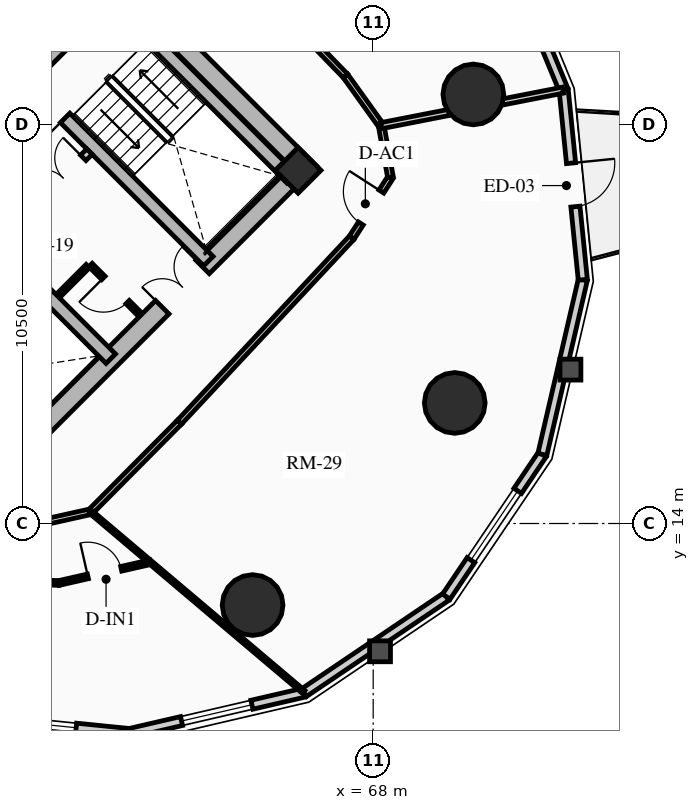
"""IFC4 building model, lengths in metres.
Left out: names, types, materials, properties, quantities, classifications, styles, units other than length and angle.
Written with IfcOpenShell. Run it as: python <this file> out.ifc"""

import sys

from ifc_helpers import new_model, si_unit, direction, frame, frame_2d, origin, origin_2d, place, context, subcontext, project, spatial, rectangle, circle, extrude, source, transform, mapped, element, fill, save


model = new_model("IFC4")
c1 = context("Model", 3, precision=1e-05, world=origin(), true_north=direction((0.0, 1.0)))
c2 = subcontext(c1, "Body", "Model", "MODEL_VIEW")
j1 = project(units=[si_unit("LENGTHUNIT", "METRE"), si_unit("PLANEANGLEUNIT", "RADIAN")], contexts=[c1])
p1 = place(None, origin())
s1 = spatial("IfcSite", under=j1, at=p1, CompositionType="ELEMENT")
p2 = place(p1, origin())
s2 = spatial("IfcBuilding", under=s1, at=p2, CompositionType="ELEMENT")
p3 = place(p2, frame((0.0, 0.0, 24.91)))
s3 = spatial("IfcBuildingStorey", under=s2, at=p3, CompositionType="ELEMENT", Elevation=24.91)
p4 = place(p3, frame((66.339, 23.227, 0.0), z_axis=(0.0, 0.0, 1.0), x_axis=(-0.707106781187, 0.707106781187, 0.0)))
e1 = element("IfcWall", 1, at=p4, inside=s3, PredefinedType="SHEAR", context=c2, shape_type="SweptSolid", body=[
    extrude(rectangle(XDim=14.3, YDim=0.5, at=frame_2d((7.15, 0.0))), origin(), (0.0, 0.0, 1.0), 2.91),
])
p5 = place(p3, frame((58.596, 15.838, 0.0), z_axis=(0.0, 0.0, 1.0), x_axis=(0.707106781187, 0.707106781187, 0.0)))
e2 = element("IfcWall", 2, at=p5, inside=s3, PredefinedType="SHEAR", context=c2, shape_type="SweptSolid", body=[
    extrude(rectangle(XDim=10.7, YDim=0.5, at=frame_2d((5.35, 0.0))), origin(), (0.0, 0.0, 1.0), 2.91),
])
m1 = source(origin(), c2, "Body", "SweptSolid", [
    extrude(rectangle(XDim=1.5, YDim=2.02, at=frame_2d((0.75, 1.01))), frame((0.0, 0.26, 0.0), z_axis=(0.0, -1.0, 0.0), x_axis=(1.0, 0.0, 0.0)), (0.0, 0.0, 1.0), 0.52),
])
p6 = place(p5, frame((5.45, 0.0, 0.0)))
e3 = element("IfcOpeningElement", 3, at=p6, cuts=e2, PredefinedType="OPENING", context=c2, shape_type="MappedRepresentation", body=[
    mapped(m1, transform((0.0, 0.0, 0.0), x_axis=(1.0, 0.0, 0.0), y_axis=(0.0, 1.0, 0.0), z_axis=(0.0, 0.0, 1.0), scale=1.0)),
])
p7 = place(p3, frame((61.096, 18.338, 0.0), z_axis=(0.0, 0.0, 1.0), x_axis=(-0.707106781187, 0.707106781187, 0.0)))
e4 = element("IfcWall", 4, at=p7, inside=s3, PredefinedType="SHEAR", context=c2, shape_type="SweptSolid", body=[
    extrude(rectangle(XDim=13.8, YDim=0.35, at=frame_2d((6.9, 0.0))), origin(), (0.0, 0.0, 1.0), 2.91),
])
m2 = source(origin(), c2, "Body", "SweptSolid", [
    extrude(rectangle(XDim=1.1, YDim=2.015, at=frame_2d((0.55, 1.007))), frame((0.0, 0.185, 0.0), z_axis=(0.0, -1.0, 0.0), x_axis=(1.0, 0.0, 0.0)), (0.0, 0.0, 1.0), 0.37),
])
p8 = place(p7, frame((4.9, 0.0, 0.0)))
e5 = element("IfcOpeningElement", 5, at=p8, cuts=e4, PredefinedType="OPENING", context=c2, shape_type="MappedRepresentation", body=[
    mapped(m2, transform((0.0, 0.0, 0.0), x_axis=(1.0, 0.0, 0.0), y_axis=(0.0, 1.0, 0.0), z_axis=(0.0, 0.0, 1.0), scale=1.0)),
])
m3 = source(origin(), c2, "Body", "SweptSolid", [
    extrude(rectangle(XDim=1.15, YDim=2.02, at=frame_2d((0.575, 1.01))), frame((0.0, 0.185, 0.0), z_axis=(0.0, -1.0, 0.0), x_axis=(1.0, 0.0, 0.0)), (0.0, 0.0, 1.0), 0.37),
])
p9 = place(p7, frame((7.32, 0.0, 0.0)))
e6 = element("IfcOpeningElement", 6, at=p9, cuts=e4, PredefinedType="OPENING", context=c2, shape_type="MappedRepresentation", body=[
    mapped(m3, transform((0.0, 0.0, 0.0), x_axis=(1.0, 0.0, 0.0), y_axis=(0.0, 1.0, 0.0), z_axis=(0.0, 0.0, 1.0), scale=1.0)),
])
p10 = place(p3, frame((63.662, 20.904, 0.0), z_axis=(0.0, 0.0, 1.0), x_axis=(-0.707106781187, 0.707106781187, 0.0)))
e7 = element("IfcWall", 7, at=p10, inside=s3, PredefinedType="SHEAR", context=c2, shape_type="SweptSolid", body=[
    extrude(rectangle(XDim=13.8, YDim=0.35, at=frame_2d((6.9, 0.0))), origin(), (0.0, 0.0, 1.0), 2.91),
])
p11 = place(p10, frame((10.025, 0.0, 0.0)))
e8 = element("IfcOpeningElement", 8, at=p11, cuts=e7, PredefinedType="OPENING", context=c2, shape_type="MappedRepresentation", body=[
    mapped(m2, transform((0.0, 0.0, 0.0), x_axis=(1.0, 0.0, 0.0), y_axis=(0.0, 1.0, 0.0), z_axis=(0.0, 0.0, 1.0), scale=1.0)),
])
p12 = place(p10, frame((12.025, 0.0, 0.0)))
e9 = element("IfcOpeningElement", 9, at=p12, cuts=e7, PredefinedType="OPENING", context=c2, shape_type="MappedRepresentation", body=[
    mapped(m2, transform((0.0, 0.0, 0.0), x_axis=(1.0, 0.0, 0.0), y_axis=(0.0, 1.0, 0.0), z_axis=(0.0, 0.0, 1.0), scale=1.0)),
])
p13 = place(p10, frame((5.33, 0.0, 0.0)))
e10 = element("IfcOpeningElement", 10, at=p13, cuts=e7, PredefinedType="OPENING", context=c2, shape_type="MappedRepresentation", body=[
    mapped(m3, transform((0.0, 0.0, 0.0), x_axis=(1.0, 0.0, 0.0), y_axis=(0.0, 1.0, 0.0), z_axis=(0.0, 0.0, 1.0), scale=1.0)),
])
p14 = place(p3, frame((65.847, 23.089, 0.0), z_axis=(0.0, 0.0, 1.0), x_axis=(-0.707106781187, 0.707106781187, 0.0)))
e11 = element("IfcWall", 11, at=p14, inside=s3, PredefinedType="SHEAR", context=c2, shape_type="SweptSolid", body=[
    extrude(rectangle(XDim=6.745, YDim=0.35, at=frame_2d((3.373, 0.0))), origin(), (0.0, 0.0, 1.0), 2.91),
])
p15 = place(p3, frame((58.893, 25.674, 0.0), z_axis=(0.0, 0.0, 1.0), x_axis=(0.707106781187, 0.707106781187, 0.0)))
e12 = element("IfcWall", 12, at=p15, inside=s3, PredefinedType="SHEAR", context=c2, shape_type="SweptSolid", body=[
    extrude(rectangle(XDim=3.285, YDim=0.35, at=frame_2d((1.643, 0.0))), origin(), (0.0, 0.0, 1.0), 2.91),
])
p16 = place(p3, frame((66.024, 23.294, 0.0), z_axis=(0.0, 0.0, 1.0), x_axis=(0.707106781187, 0.707106781187, 0.0)))
e13 = element("IfcColumn", 13, at=p16, inside=s3, PredefinedType="COLUMN", context=c2, shape_type="SweptSolid", body=[
    extrude(rectangle(XDim=0.85, YDim=0.85, at=origin_2d()), origin(), (0.0, 0.0, 1.0), 2.91),
])
for number, where, z_axis, x_axis in (
    (14, (64.827, 11.854, 0.0), (0.0, 0.0, 1.0), (1.0, 0.0, 0.0)),
    (15, (70.146, 17.173, 0.0), (0.0, 0.0, 1.0), (1.0, 0.0, 0.0)),
    (16, (70.635, 25.291, 0.0), (0.0, 0.0, 1.0), (1.0, 0.0, 0.0)),
):
    element("IfcColumn", number, at=place(p3, frame(where, z_axis=z_axis, x_axis=x_axis)), inside=s3, PredefinedType="USERDEFINED", context=c2, shape_type="SweptSolid", body=[
        extrude(circle(Radius=0.8, at=origin_2d()), origin(), (0.0, 0.0, 1.0), 2.91),
    ])
p17 = place(p3, frame((61.586, 8.484, 0.0), z_axis=(0.0, 0.0, 1.0), x_axis=(-0.994951574538, 0.100356187272, 0.0)))
e17 = element("IfcWall", 17, at=p17, inside=s3, PredefinedType="SOLIDWALL", context=c2, shape_type="SweptSolid", body=[
    extrude(rectangle(XDim=5.019, YDim=0.24, at=frame_2d((2.509, 0.0))), origin(), (0.0, 0.0, 1.0), 2.073),
])
m4 = source(origin(), c2, "Body", "SweptSolid", [
    extrude(rectangle(XDim=2.2, YDim=1.35, at=frame_2d((1.1, 0.675))), frame((0.0, 0.13, 0.0), z_axis=(0.0, -1.0, 0.0), x_axis=(1.0, 0.0, 0.0)), (0.0, 0.0, 1.0), 0.26),
])
p18 = place(p17, frame((1.409, 0.0, 0.65)))
e18 = element("IfcOpeningElement", 18, at=p18, cuts=e17, PredefinedType="OPENING", context=c2, shape_type="MappedRepresentation", body=[
    mapped(m4, transform((0.0, 0.0, 0.0), x_axis=(1.0, 0.0, 0.0), y_axis=(0.0, 1.0, 0.0), z_axis=(0.0, 0.0, 1.0), scale=1.0)),
])
p19 = place(p3, frame((66.18, 9.548, 0.0), z_axis=(0.0, 0.0, 1.0), x_axis=(-0.974197104074, -0.225698919833, 0.0)))
e19 = element("IfcWall", 19, at=p19, inside=s3, PredefinedType="SOLIDWALL", context=c2, shape_type="SweptSolid", body=[
    extrude(rectangle(XDim=4.715, YDim=0.24, at=frame_2d((2.357, 0.0))), origin(), (0.0, 0.0, 1.0), 2.073),
])
m5 = source(origin(), c2, "Body", "SweptSolid", [
    extrude(rectangle(XDim=1.9, YDim=1.35, at=frame_2d((0.95, 0.675))), frame((0.0, 0.13, 0.0), z_axis=(0.0, -1.0, 0.0), x_axis=(1.0, 0.0, 0.0)), (0.0, 0.0, 1.0), 0.26),
])
p20 = place(p19, frame((1.408, 0.0, 0.65)))
e20 = element("IfcOpeningElement", 20, at=p20, cuts=e19, PredefinedType="OPENING", context=c2, shape_type="MappedRepresentation", body=[
    mapped(m5, transform((0.0, 0.0, 0.0), x_axis=(1.0, 0.0, 0.0), y_axis=(0.0, 1.0, 0.0), z_axis=(0.0, 0.0, 1.0), scale=1.0)),
])
p21 = place(p3, frame((69.924, 12.076, 0.0), z_axis=(0.0, 0.0, 1.0), x_axis=(-0.828776615238, -0.559579594012, 0.0)))
e21 = element("IfcWall", 21, at=p21, inside=s3, PredefinedType="SOLIDWALL", context=c2, shape_type="SweptSolid", body=[
    extrude(rectangle(XDim=4.517, YDim=0.24, at=frame_2d((2.259, 0.0))), origin(), (0.0, 0.0, 1.0), 2.073),
])
p22 = place(p3, frame((72.452, 15.82, 0.0), z_axis=(0.0, 0.0, 1.0), x_axis=(-0.559579594012, -0.828776615238, 0.0)))
e22 = element("IfcWall", 22, at=p22, inside=s3, PredefinedType="SOLIDWALL", context=c2, shape_type="SweptSolid", body=[
    extrude(rectangle(XDim=4.517, YDim=0.24, at=frame_2d((2.259, 0.0))), origin(), (0.0, 0.0, 1.0), 2.073),
])
p23 = place(p22, frame((1.159, 0.0, 0.65)))
e23 = element("IfcOpeningElement", 23, at=p23, cuts=e22, PredefinedType="OPENING", context=c2, shape_type="MappedRepresentation", body=[
    mapped(m4, transform((0.0, 0.0, 0.0), x_axis=(1.0, 0.0, 0.0), y_axis=(0.0, 1.0, 0.0), z_axis=(0.0, 0.0, 1.0), scale=1.0)),
])
p24 = place(p3, frame((73.516, 20.414, 0.0), z_axis=(0.0, 0.0, 1.0), x_axis=(-0.225698919833, -0.974197104074, 0.0)))
e24 = element("IfcWall", 24, at=p24, inside=s3, PredefinedType="SOLIDWALL", context=c2, shape_type="SweptSolid", body=[
    extrude(rectangle(XDim=4.715, YDim=0.24, at=frame_2d((2.357, 0.0))), origin(), (0.0, 0.0, 1.0), 2.073),
])
p25 = place(p3, frame((73.012, 25.407, 0.0), z_axis=(0.0, 0.0, 1.0), x_axis=(0.100356187272, -0.994951574538, 0.0)))
e25 = element("IfcWall", 25, at=p25, inside=s3, PredefinedType="SOLIDWALL", context=c2, shape_type="SweptSolid", body=[
    extrude(rectangle(XDim=5.019, YDim=0.24, at=frame_2d((2.509, 0.0))), origin(), (0.0, 0.0, 1.0), 2.073),
])
m6 = source(origin(), c2, "Body", "SweptSolid", [
    extrude(rectangle(XDim=1.15, YDim=2.005, at=frame_2d((0.575, 1.002))), frame((0.0, 0.13, 0.0), z_axis=(0.0, -1.0, 0.0), x_axis=(1.0, 0.0, 0.0)), (0.0, 0.0, 1.0), 0.26),
])
p26 = place(p25, frame((1.934, 0.0, 0.0)))
e26 = element("IfcOpeningElement", 26, at=p26, cuts=e25, PredefinedType="OPENING", context=c2, shape_type="MappedRepresentation", body=[
    mapped(m6, transform((0.0, 0.0, 0.0), x_axis=(1.0, 0.0, 0.0), y_axis=(0.0, 1.0, 0.0), z_axis=(0.0, 0.0, 1.0), scale=1.0)),
])
p27 = place(p3, frame((70.99, 30.312, 0.0), z_axis=(0.0, 0.0, 1.0), x_axis=(0.381113147118, -0.924528403616, 0.0)))
e27 = element("IfcWall", 27, at=p27, inside=s3, PredefinedType="SOLIDWALL", context=c2, shape_type="SweptSolid", body=[
    extrude(rectangle(XDim=5.305, YDim=0.24, at=frame_2d((2.653, 0.0))), origin(), (0.0, 0.0, 1.0), 2.073),
])
p28 = place(p3, frame((58.214, 21.467, 0.0), z_axis=(0.0, 0.0, 1.0), x_axis=(0.707106781187, 0.707106781187, 0.0)))
e28 = element("IfcWall", 28, at=p28, inside=s3, PredefinedType="PARTITIONING", context=c2, shape_type="SweptSolid", body=[
    extrude(rectangle(XDim=3.28, YDim=0.2, at=frame_2d((1.64, 0.0))), origin(), (0.0, 0.0, 1.0), 2.635),
])
m7 = source(origin(), c2, "Body", "SweptSolid", [
    extrude(rectangle(XDim=1.5, YDim=2.02, at=frame_2d((0.75, 1.01))), frame((0.0, 0.11, 0.0), z_axis=(0.0, -1.0, 0.0), x_axis=(1.0, 0.0, 0.0)), (0.0, 0.0, 1.0), 0.22),
])
p29 = place(p28, frame((1.55, 0.0, 0.0)))
e29 = element("IfcOpeningElement", 29, at=p29, cuts=e28, PredefinedType="OPENING", context=c2, shape_type="MappedRepresentation", body=[
    mapped(m7, transform((0.0, 0.0, 0.0), x_axis=(1.0, 0.0, 0.0), y_axis=(0.0, 1.0, 0.0), z_axis=(0.0, 0.0, 1.0), scale=1.0)),
])
p30 = place(p3, frame((61.835, 19.529, 0.0), z_axis=(0.0, 0.0, 1.0), x_axis=(-0.707174592913, 0.707038962956, 0.0)))
e30 = element("IfcWall", 30, at=p30, inside=s3, PredefinedType="PARTITIONING", context=c2, shape_type="SweptSolid", body=[
    extrude(rectangle(XDim=1.8, YDim=0.125, at=frame_2d((0.9, 0.0))), origin(), (0.0, 0.0, 1.0), 2.635),
])
m8 = source(origin(), c2, "Body", "SweptSolid", [
    extrude(rectangle(XDim=0.9, YDim=2.005, at=frame_2d((0.45, 1.002))), frame((0.0, 0.073, 0.0), z_axis=(0.0, -1.0, 0.0), x_axis=(1.0, 0.0, 0.0)), (0.0, 0.0, 1.0), 0.145),
])
p31 = place(p30, frame((0.42, 0.0, 0.0)))
e31 = element("IfcOpeningElement", 31, at=p31, cuts=e30, PredefinedType="OPENING", context=c2, shape_type="MappedRepresentation", body=[
    mapped(m8, transform((0.0, 0.0, 0.0), x_axis=(1.0, 0.0, 0.0), y_axis=(0.0, 1.0, 0.0), z_axis=(0.0, 0.0, 1.0), scale=1.0)),
])
p32 = place(p3, frame((59.713, 19.996, 0.0), z_axis=(0.0, 0.0, 1.0), x_axis=(0.707217726, 0.706995818963, 0.0)))
e32 = element("IfcWall", 32, at=p32, inside=s3, PredefinedType="PARTITIONING", context=c2, shape_type="SweptSolid", body=[
    extrude(rectangle(XDim=1.1, YDim=0.125, at=frame_2d((0.55, 0.0))), origin(), (0.0, 0.0, 1.0), 2.635),
])
p33 = place(p3, frame((59.008, 13.963, 0.0), z_axis=(0.0, 0.0, 1.0), x_axis=(0.976020856791, 0.21767702476, 0.0)))
e33 = element("IfcWall", 33, at=p33, inside=s3, PredefinedType="PARTITIONING", context=c2, shape_type="SweptSolid", body=[
    extrude(rectangle(XDim=1.593, YDim=0.15, at=frame_2d((0.796, 0.0))), origin(), (0.0, 0.0, 1.0), 2.205),
])
p34 = place(p3, frame((60.562, 14.31, 0.0), z_axis=(0.0, 0.0, 1.0), x_axis=(0.704566236161, 0.709638230975, 0.0)))
e34 = element("IfcWall", 34, at=p34, inside=s3, PredefinedType="PARTITIONING", context=c2, shape_type="SweptSolid", body=[
    extrude(rectangle(XDim=3.321, YDim=0.15, at=frame_2d((1.661, 0.0))), origin(), (0.0, 0.0, 1.0), 2.159),
])
p35 = place(p3, frame((62.903, 16.667, 0.0), z_axis=(0.0, 0.0, 1.0), x_axis=(0.682371947497, 0.731005147225, 0.0)))
e35 = element("IfcWall", 35, at=p35, inside=s3, PredefinedType="PARTITIONING", context=c2, shape_type="SweptSolid", body=[
    extrude(rectangle(XDim=6.642, YDim=0.15, at=frame_2d((3.321, 0.0))), origin(), (0.0, 0.0, 1.0), 2.159),
])
p36 = place(p3, frame((67.435, 21.521, 0.0), z_axis=(0.0, 0.0, 1.0), x_axis=(0.540777197838, 0.841165870859, 0.0)))
e36 = element("IfcWall", 36, at=p36, inside=s3, PredefinedType="PARTITIONING", context=c2, shape_type="SweptSolid", body=[
    extrude(rectangle(XDim=1.888, YDim=0.15, at=frame_2d((0.944, 0.0))), origin(), (0.0, 0.0, 1.0), 2.205),
])
m9 = source(origin(), c2, "Body", "SweptSolid", [
    extrude(rectangle(XDim=1.0, YDim=2.015, at=frame_2d((0.5, 1.007))), frame((0.0, 0.085, 0.0), z_axis=(0.0, -1.0, 0.0), x_axis=(1.0, 0.0, 0.0)), (0.0, 0.0, 1.0), 0.17),
])
p37 = place(p36, frame((0.444, 0.0, 0.0)))
e37 = element("IfcOpeningElement", 37, at=p37, cuts=e36, PredefinedType="OPENING", context=c2, shape_type="MappedRepresentation", body=[
    mapped(m9, transform((0.0, 0.0, 0.0), x_axis=(1.0, 0.0, 0.0), y_axis=(0.0, 1.0, 0.0), z_axis=(0.0, 0.0, 1.0), scale=1.0)),
])
p38 = place(p3, frame((68.456, 23.11, 0.0), z_axis=(0.0, 0.0, 1.0), x_axis=(-0.1772522795, 0.984165448191, 0.0)))
e38 = element("IfcWall", 38, at=p38, inside=s3, PredefinedType="PARTITIONING", context=c2, shape_type="SweptSolid", body=[
    extrude(rectangle(XDim=1.382, YDim=0.15, at=frame_2d((0.691, 0.0))), origin(), (0.0, 0.0, 1.0), 2.159),
])
p39 = place(p3, frame((68.211, 24.469, 0.0), z_axis=(0.0, 0.0, 1.0), x_axis=(-0.583012141368, 0.812463441034, 0.0)))
e39 = element("IfcWall", 39, at=p39, inside=s3, PredefinedType="PARTITIONING", context=c2, shape_type="SweptSolid", body=[
    extrude(rectangle(XDim=1.613, YDim=0.15, at=frame_2d((0.807, 0.0))), origin(), (0.0, 0.0, 1.0), 2.205),
])
p40 = place(p3, frame((67.27, 25.78, 0.0), z_axis=(0.0, 0.0, 1.0), x_axis=(-0.696847842907, 0.717218992942, 0.0)))
e40 = element("IfcWall", 40, at=p40, inside=s3, PredefinedType="PARTITIONING", context=c2, shape_type="SweptSolid", body=[
    extrude(rectangle(XDim=6.004, YDim=0.15, at=frame_2d((3.002, 0.0))), origin(), (0.0, 0.0, 1.0), 2.635),
])
p41 = place(p3, frame((60.562, 14.31, 0.0), z_axis=(0.0, 0.0, 1.0), x_axis=(0.763547638675, -0.645751502881, 0.0)))
e41 = element("IfcWall", 41, at=p41, inside=s3, PredefinedType="MOVABLE", context=c2, shape_type="SweptSolid", body=[
    extrude(rectangle(XDim=7.345, YDim=0.1, at=frame_2d((3.673, 0.0))), origin(), (0.0, 0.0, 1.0), 2.073),
])
p42 = place(p3, frame((68.211, 24.469, 0.0), z_axis=(0.0, 0.0, 1.0), x_axis=(0.981421381452, 0.19186472325, 0.0)))
e42 = element("IfcWall", 42, at=p42, inside=s3, PredefinedType="PARTITIONING", context=c2, shape_type="SweptSolid", body=[
    extrude(rectangle(XDim=4.872, YDim=0.16, at=frame_2d((2.436, 0.0))), origin(), (0.0, 0.0, 1.0), 2.073),
])
p43 = place(p3, frame((57.255, 12.528, 0.0), z_axis=(0.0, 0.0, 1.0), x_axis=(0.999290303909, -0.037668136579, 0.0)))
e43 = element("IfcWall", 43, at=p43, inside=s3, PredefinedType="PARTITIONING", context=c2, shape_type="SweptSolid", body=[
    extrude(rectangle(XDim=2.476, YDim=0.125, at=frame_2d((1.238, 0.0))), origin(), (0.0, 0.0, 1.0), 2.159),
])
p44 = place(p3, frame((59.729, 12.434, 0.0), z_axis=(0.0, 0.0, 1.0), x_axis=(0.975062765266, 0.221929276555, 0.0)))
e44 = element("IfcWall", 44, at=p44, inside=s3, PredefinedType="PARTITIONING", context=c2, shape_type="SweptSolid", body=[
    extrude(rectangle(XDim=2.465, YDim=0.125, at=frame_2d((1.233, 0.0))), origin(), (0.0, 0.0, 1.0), 2.205),
])
p45 = place(p44, frame((0.783, 0.0, 0.0)))
e45 = element("IfcOpeningElement", 45, at=p45, cuts=e44, PredefinedType="OPENING", context=c2, shape_type="MappedRepresentation", body=[
    mapped(m8, transform((0.0, 0.0, 0.0), x_axis=(1.0, 0.0, 0.0), y_axis=(0.0, 1.0, 0.0), z_axis=(0.0, 0.0, 1.0), scale=1.0)),
])
m10 = source(origin(), c2, "Body", "SweptSolid", [
    extrude(rectangle(XDim=2.2, YDim=1.35, at=frame_2d((1.1, 0.675))), frame((0.0, 0.03, 0.0), z_axis=(0.0, -1.0, 0.0), x_axis=(1.0, 0.0, 0.0)), (0.0, 0.0, 1.0), 0.06),
])
p46 = place(p18, origin())
e46 = element("IfcWindow", 46, at=p46, inside=s3, PartitioningType="DOUBLE_PANEL_VERTICAL", PredefinedType="WINDOW", context=c2, shape_type="MappedRepresentation", body=[
    mapped(m10, transform((0.0, 0.0, 0.0), x_axis=(1.0, 0.0, 0.0), y_axis=(0.0, 1.0, 0.0), z_axis=(0.0, 0.0, 1.0), scale=1.0)),
])
fill(e18, e46)
m11 = source(origin(), c2, "Body", "SweptSolid", [
    extrude(rectangle(XDim=1.9, YDim=1.35, at=frame_2d((0.95, 0.675))), frame((0.0, 0.03, 0.0), z_axis=(0.0, -1.0, 0.0), x_axis=(1.0, 0.0, 0.0)), (0.0, 0.0, 1.0), 0.06),
])
p47 = place(p20, origin())
e47 = element("IfcWindow", 47, at=p47, inside=s3, PartitioningType="DOUBLE_PANEL_VERTICAL", PredefinedType="WINDOW", context=c2, shape_type="MappedRepresentation", body=[
    mapped(m11, transform((0.0, 0.0, 0.0), x_axis=(1.0, 0.0, 0.0), y_axis=(0.0, 1.0, 0.0), z_axis=(0.0, 0.0, 1.0), scale=1.0)),
])
fill(e20, e47)
p48 = place(p23, origin())
e48 = element("IfcWindow", 48, at=p48, inside=s3, PartitioningType="DOUBLE_PANEL_VERTICAL", PredefinedType="WINDOW", context=c2, shape_type="MappedRepresentation", body=[
    mapped(m10, transform((0.0, 0.0, 0.0), x_axis=(1.0, 0.0, 0.0), y_axis=(0.0, 1.0, 0.0), z_axis=(0.0, 0.0, 1.0), scale=1.0)),
])
fill(e23, e48)
m12 = source(origin(), c2, "Body", "SweptSolid", [
    extrude(rectangle(XDim=1.15, YDim=2.005, at=frame_2d((0.575, 1.002))), frame((0.0, 0.025, 0.0), z_axis=(0.0, -1.0, 0.0), x_axis=(1.0, 0.0, 0.0)), (0.0, 0.0, 1.0), 0.05),
])
p49 = place(p26, origin())
e49 = element("IfcDoor", 49, at=p49, inside=s3, OperationType="SINGLE_SWING_LEFT", PredefinedType="DOOR", context=c2, shape_type="MappedRepresentation", body=[
    mapped(m12, transform((0.0, 0.0, 0.0), x_axis=(1.0, 0.0, 0.0), y_axis=(0.0, 1.0, 0.0), z_axis=(0.0, 0.0, 1.0), scale=1.0)),
])
fill(e26, e49)
m13 = source(origin(), c2, "Body", "SweptSolid", [
    extrude(rectangle(XDim=1.15, YDim=2.02, at=frame_2d((0.575, 1.01))), frame((0.0, 0.025, 0.0), z_axis=(0.0, -1.0, 0.0), x_axis=(1.0, 0.0, 0.0)), (0.0, 0.0, 1.0), 0.05),
])
p50 = place(p13, origin())
e50 = element("IfcDoor", 50, at=p50, inside=s3, OperationType="SINGLE_SWING_LEFT", PredefinedType="DOOR", context=c2, shape_type="MappedRepresentation", body=[
    mapped(m13, transform((0.0, 0.0, 0.0), x_axis=(1.0, 0.0, 0.0), y_axis=(0.0, 1.0, 0.0), z_axis=(0.0, 0.0, 1.0), scale=1.0)),
])
fill(e10, e50)
m14 = source(origin(), c2, "Body", "SweptSolid", [
    extrude(rectangle(XDim=1.5, YDim=2.02, at=frame_2d((0.75, 1.01))), frame((0.0, 0.025, 0.0), z_axis=(0.0, -1.0, 0.0), x_axis=(1.0, 0.0, 0.0)), (0.0, 0.0, 1.0), 0.05),
])
p51 = place(p6, origin())
e51 = element("IfcDoor", 51, at=p51, inside=s3, OperationType="DOUBLE_DOOR_SINGLE_SWING", PredefinedType="DOOR", context=c2, shape_type="MappedRepresentation", body=[
    mapped(m14, transform((0.0, 0.0, 0.0), x_axis=(1.0, 0.0, 0.0), y_axis=(0.0, 1.0, 0.0), z_axis=(0.0, 0.0, 1.0), scale=1.0)),
])
fill(e3, e51)
p52 = place(p29, origin())
e52 = element("IfcDoor", 52, at=p52, inside=s3, OperationType="DOUBLE_DOOR_SINGLE_SWING", PredefinedType="DOOR", context=c2, shape_type="MappedRepresentation", body=[
    mapped(m14, transform((0.0, 0.0, 0.0), x_axis=(1.0, 0.0, 0.0), y_axis=(0.0, 1.0, 0.0), z_axis=(0.0, 0.0, 1.0), scale=1.0)),
])
fill(e29, e52)
m15 = source(origin(), c2, "Body", "SweptSolid", [
    extrude(rectangle(XDim=0.9, YDim=2.005, at=frame_2d((0.45, 1.002))), frame((0.0, 0.025, 0.0), z_axis=(0.0, -1.0, 0.0), x_axis=(1.0, 0.0, 0.0)), (0.0, 0.0, 1.0), 0.05),
])
p53 = place(p31, origin())
e53 = element("IfcDoor", 53, at=p53, inside=s3, OperationType="SINGLE_SWING_RIGHT", PredefinedType="DOOR", context=c2, shape_type="MappedRepresentation", body=[
    mapped(m15, transform((0.0, 0.0, 0.0), x_axis=(1.0, 0.0, 0.0), y_axis=(0.0, 1.0, 0.0), z_axis=(0.0, 0.0, 1.0), scale=1.0)),
])
fill(e31, e53)
p54 = place(p45, origin())
e54 = element("IfcDoor", 54, at=p54, inside=s3, OperationType="SINGLE_SWING_LEFT", PredefinedType="DOOR", context=c2, shape_type="MappedRepresentation", body=[
    mapped(m15, transform((0.0, 0.0, 0.0), x_axis=(1.0, 0.0, 0.0), y_axis=(0.0, 1.0, 0.0), z_axis=(0.0, 0.0, 1.0), scale=1.0)),
])
fill(e45, e54)
m16 = source(origin(), c2, "Body", "SweptSolid", [
    extrude(rectangle(XDim=1.0, YDim=2.015, at=frame_2d((0.5, 1.007))), frame((0.0, 0.025, 0.0), z_axis=(0.0, -1.0, 0.0), x_axis=(1.0, 0.0, 0.0)), (0.0, 0.0, 1.0), 0.05),
])
p55 = place(p37, origin())
e55 = element("IfcDoor", 55, at=p55, inside=s3, OperationType="SINGLE_SWING_RIGHT", PredefinedType="DOOR", context=c2, shape_type="MappedRepresentation", body=[
    mapped(m16, transform((0.0, 0.0, 0.0), x_axis=(1.0, 0.0, 0.0), y_axis=(0.0, 1.0, 0.0), z_axis=(0.0, 0.0, 1.0), scale=1.0)),
])
fill(e37, e55)
save(model, sys.argv[1])
